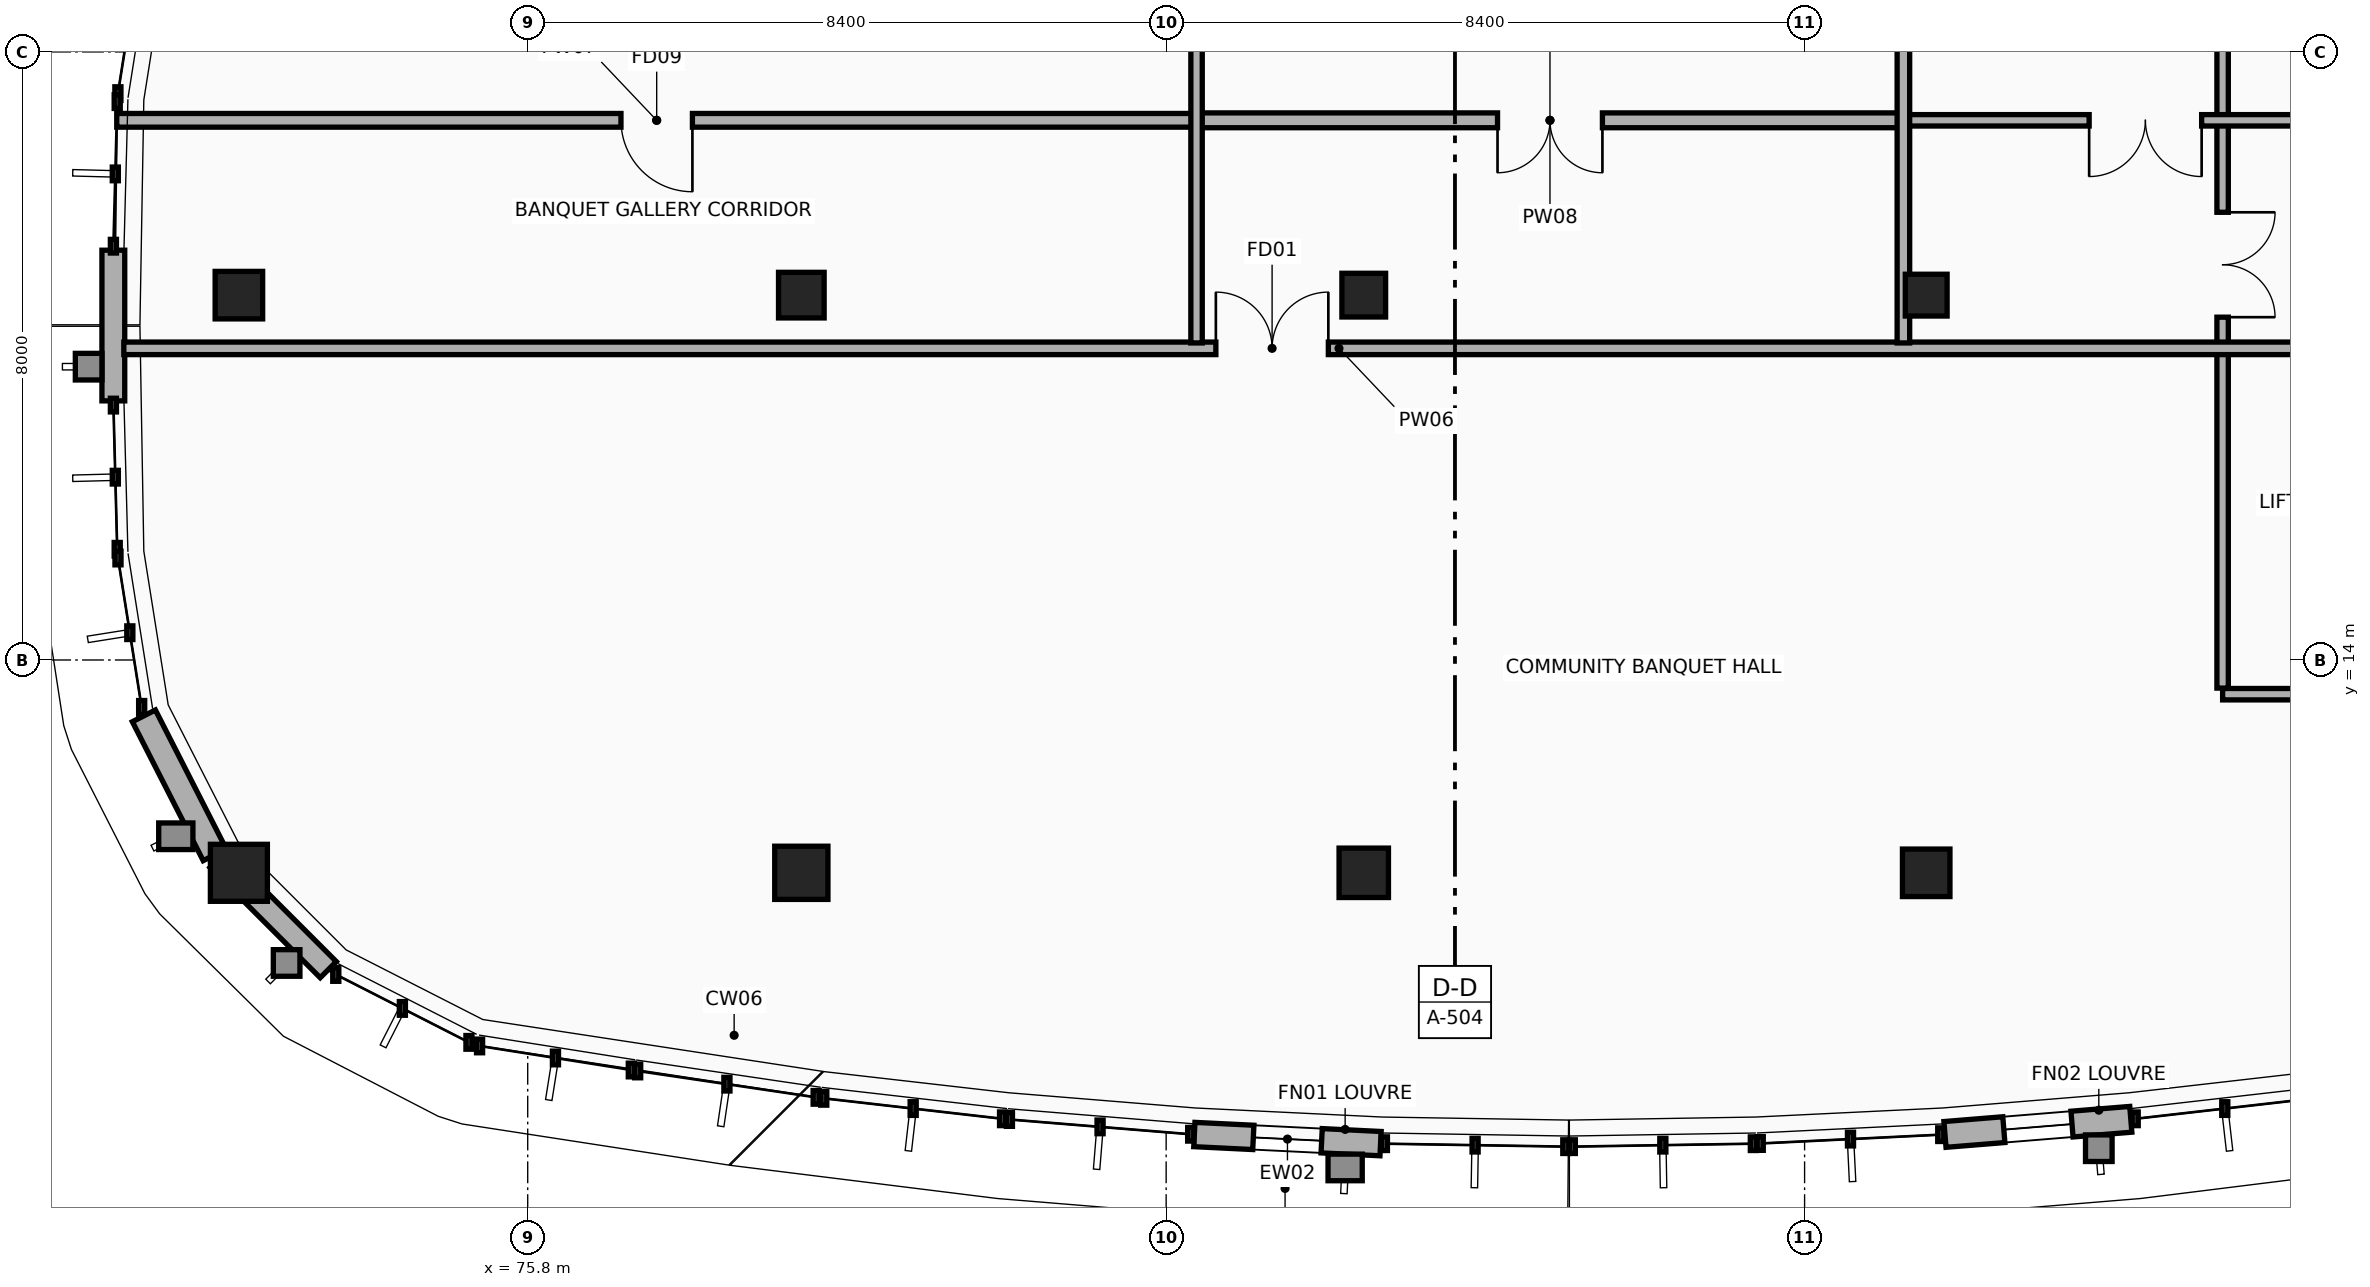
"""IFC4 building model, lengths in metres.
Left out: names, types, materials, properties, quantities, classifications, styles, units other than length and angle.
Written with IfcOpenShell. Run it as: python <this file> out.ifc"""

import sys

from ifc_helpers import new_model, si_unit, direction, frame, frame_2d, origin, origin_2d, place, context, subcontext, project, spatial, rectangle, extrude, element, fill, save


model = new_model("IFC4")
c1 = context("Model", 3, precision=1e-05, world=origin(), true_north=direction((0.0, 1.0)))
c2 = subcontext(c1, "Body", "Model", "MODEL_VIEW")
j1 = project(units=[si_unit("LENGTHUNIT", "METRE"), si_unit("PLANEANGLEUNIT", "RADIAN")], contexts=[c1])
p1 = place(None, origin())
s1 = spatial("IfcSite", under=j1, at=p1, CompositionType="ELEMENT")
p2 = place(p1, origin())
s2 = spatial("IfcBuilding", under=s1, at=p2, CompositionType="ELEMENT")
p3 = place(p2, frame((0.0, 0.0, 4.8)))
s3 = spatial("IfcBuildingStorey", under=s2, at=p3, CompositionType="ELEMENT", Elevation=4.8)
p4 = place(p3, frame((72.0, 11.2, 0.0), z_axis=(0.0, 0.0, 1.0), x_axis=(1.0, 0.0, 0.0)))
e1 = element("IfcColumn", 1, at=p4, inside=s3, PredefinedType="COLUMN", context=c2, shape_type="SweptSolid", body=[
    extrude(rectangle(XDim=0.75, YDim=0.75, at=origin_2d()), origin(), (0.0, 0.0, 1.0), 3.9),
])
p5 = place(p3, frame((72.0, 18.8, 0.0), z_axis=(0.0, 0.0, 1.0), x_axis=(1.0, 0.0, 0.0)))
e2 = element("IfcColumn", 2, at=p5, inside=s3, PredefinedType="COLUMN", context=c2, shape_type="SweptSolid", body=[
    extrude(rectangle(XDim=0.625, YDim=0.625, at=origin_2d()), origin(), (0.0, 0.0, 1.0), 3.9),
])
p6 = place(p3, frame((79.4, 11.2, 0.0), z_axis=(0.0, 0.0, 1.0), x_axis=(1.0, 0.0, 0.0)))
e3 = element("IfcColumn", 3, at=p6, inside=s3, PredefinedType="COLUMN", context=c2, shape_type="SweptSolid", body=[
    extrude(rectangle(XDim=0.7, YDim=0.7, at=origin_2d()), origin(), (0.0, 0.0, 1.0), 3.9),
])
p7 = place(p3, frame((79.4, 18.8, 0.0), z_axis=(0.0, 0.0, 1.0), x_axis=(1.0, 0.0, 0.0)))
e4 = element("IfcColumn", 4, at=p7, inside=s3, PredefinedType="COLUMN", context=c2, shape_type="SweptSolid", body=[
    extrude(rectangle(XDim=0.6, YDim=0.6, at=origin_2d()), origin(), (0.0, 0.0, 1.0), 3.9),
])
p8 = place(p3, frame((86.8, 11.2, 0.0), z_axis=(0.0, 0.0, 1.0), x_axis=(1.0, 0.0, 0.0)))
e5 = element("IfcColumn", 5, at=p8, inside=s3, PredefinedType="COLUMN", context=c2, shape_type="SweptSolid", body=[
    extrude(rectangle(XDim=0.65, YDim=0.65, at=origin_2d()), origin(), (0.0, 0.0, 1.0), 3.9),
])
p9 = place(p3, frame((86.8, 18.8, 0.0), z_axis=(0.0, 0.0, 1.0), x_axis=(1.0, 0.0, 0.0)))
e6 = element("IfcColumn", 6, at=p9, inside=s3, PredefinedType="COLUMN", context=c2, shape_type="SweptSolid", body=[
    extrude(rectangle(XDim=0.575, YDim=0.575, at=origin_2d()), origin(), (0.0, 0.0, 1.0), 3.9),
])
p10 = place(p3, frame((94.2, 11.2, 0.0), z_axis=(0.0, 0.0, 1.0), x_axis=(1.0, 0.0, 0.0)))
e7 = element("IfcColumn", 7, at=p10, inside=s3, PredefinedType="COLUMN", context=c2, shape_type="SweptSolid", body=[
    extrude(rectangle(XDim=0.625, YDim=0.625, at=origin_2d()), origin(), (0.0, 0.0, 1.0), 3.9),
])
p11 = place(p3, frame((94.2, 18.8, 0.0), z_axis=(0.0, 0.0, 1.0), x_axis=(1.0, 0.0, 0.0)))
e8 = element("IfcColumn", 8, at=p11, inside=s3, PredefinedType="COLUMN", context=c2, shape_type="SweptSolid", body=[
    extrude(rectangle(XDim=0.55, YDim=0.55, at=origin_2d()), origin(), (0.0, 0.0, 1.0), 3.9),
])
p12 = place(p3, frame((87.021, 7.637, 0.0), z_axis=(0.0, 0.0, 1.0), x_axis=(-0.998800270453, 0.048969579777, 0.0)))
e9 = element("IfcWall", 9, at=p12, inside=s3, PredefinedType="STANDARD", context=c2, shape_type="SweptSolid", body=[
    extrude(rectangle(XDim=2.453, YDim=0.32, at=frame_2d((1.227, 0.0))), origin(), (0.0, 0.0, 1.0), 3.62),
])
p13 = place(p12, frame((0.776, 0.0, 0.9)))
e10 = element("IfcOpeningElement", 10, at=p13, cuts=e9, PredefinedType="OPENING", context=c2, shape_type="SweptSolid", body=[
    extrude(rectangle(XDim=0.9, YDim=1.2, at=frame_2d((0.45, 0.6))), frame((0.0, 0.17, 0.0), z_axis=(0.0, -1.0, 0.0), x_axis=(1.0, 0.0, 0.0)), (0.0, 0.0, 1.0), 0.34),
])
p14 = place(p3, frame((96.892, 7.957, 0.0), z_axis=(0.0, 0.0, 1.0), x_axis=(-0.996705171675, -0.081109806781, 0.0)))
e11 = element("IfcWall", 11, at=p14, inside=s3, PredefinedType="STANDARD", context=c2, shape_type="SweptSolid", body=[
    extrude(rectangle(XDim=2.453, YDim=0.34, at=frame_2d((1.227, 0.0))), origin(), (0.0, 0.0, 1.0), 3.62),
])
p15 = place(p14, frame((0.776, 0.0, 0.9)))
e12 = element("IfcOpeningElement", 12, at=p15, cuts=e11, PredefinedType="OPENING", context=c2, shape_type="SweptSolid", body=[
    extrude(rectangle(XDim=0.9, YDim=1.2, at=frame_2d((0.45, 0.6))), frame((0.0, 0.18, 0.0), z_axis=(0.0, -1.0, 0.0), x_axis=(1.0, 0.0, 0.0)), (0.0, 0.0, 1.0), 0.36),
])
p16 = place(p3, frame((70.348, 17.409, 0.0), z_axis=(0.0, 0.0, 1.0), x_axis=(0.0, 1.0, 0.0)))
e13 = element("IfcWall", 13, at=p16, inside=s3, PredefinedType="STANDARD", context=c2, shape_type="SweptSolid", body=[
    extrude(rectangle(XDim=1.982, YDim=0.3, at=frame_2d((0.991, 0.0))), origin(), (0.0, 0.0, 1.0), 3.612),
])
p17 = place(p3, frame((71.682, 11.437, 0.0), z_axis=(0.0, 0.0, 1.0), x_axis=(-0.454196706874, 0.890901426346, 0.0)))
e14 = element("IfcWall", 14, at=p17, inside=s3, PredefinedType="STANDARD", context=c2, shape_type="SweptSolid", body=[
    extrude(rectangle(XDim=2.052, YDim=0.34, at=frame_2d((1.026, 0.0))), origin(), (0.0, 0.0, 1.0), 3.62),
])
p18 = place(p3, frame((73.176, 9.926, 0.0), z_axis=(0.0, 0.0, 1.0), x_axis=(-0.707106781187, 0.707106781187, 0.0)))
e15 = element("IfcWall", 15, at=p18, inside=s3, PredefinedType="STANDARD", context=c2, shape_type="SweptSolid", body=[
    extrude(rectangle(XDim=2.051, YDim=0.3, at=frame_2d((1.025, 0.0))), origin(), (0.0, 0.0, 1.0), 3.108),
])
p19 = place(p3, frame((98.1, 13.55, 0.0), z_axis=(0.0, 0.0, 1.0), x_axis=(1.0, 0.0, 0.0)))
e16 = element("IfcWall", 16, at=p19, inside=s3, PredefinedType="PARTITIONING", context=c2, shape_type="SweptSolid", body=[
    extrude(rectangle(XDim=4.365, YDim=0.15, at=frame_2d((2.183, 0.0))), origin(), (0.0, 0.0, 1.0), 3.045),
])
p20 = place(p3, frame((98.1, 24.77, 0.0), z_axis=(0.0, 0.0, 1.0), x_axis=(0.0, -1.0, 0.0)))
e17 = element("IfcWall", 17, at=p20, inside=s3, PredefinedType="PARTITIONING", context=c2, shape_type="SweptSolid", body=[
    extrude(rectangle(XDim=11.14, YDim=0.15, at=frame_2d((5.57, 0.0))), origin(), (0.0, 0.0, 1.0), 3.232),
])
p21 = place(p20, frame((4.88, 0.0, 0.0)))
e18 = element("IfcOpeningElement", 18, at=p21, cuts=e17, PredefinedType="OPENING", context=c2, shape_type="SweptSolid", body=[
    extrude(rectangle(XDim=1.38, YDim=2.2, at=frame_2d((0.69, 1.1))), frame((0.0, 0.085, 0.0), z_axis=(0.0, -1.0, 0.0), x_axis=(1.0, 0.0, 0.0)), (0.0, 0.0, 1.0), 0.17),
])
p22 = place(p3, frame((70.486, 18.1, 0.0), z_axis=(0.0, 0.0, 1.0), x_axis=(1.0, 0.0, 0.0)))
e19 = element("IfcWall", 19, at=p22, inside=s3, PredefinedType="PARTITIONING", context=c2, shape_type="SweptSolid", body=[
    extrude(rectangle(XDim=31.976, YDim=0.165, at=frame_2d((15.988, 0.0))), origin(), (0.0, 0.0, 1.0), 3.045),
])
p23 = place(p22, frame((14.368, 0.0, 0.0)))
e20 = element("IfcOpeningElement", 20, at=p23, cuts=e19, PredefinedType="OPENING", context=c2, shape_type="SweptSolid", body=[
    extrude(rectangle(XDim=1.48, YDim=2.22, at=frame_2d((0.74, 1.11))), frame((0.0, 0.093, 0.0), z_axis=(0.0, -1.0, 0.0), x_axis=(1.0, 0.0, 0.0)), (0.0, 0.0, 1.0), 0.185),
])
p24 = place(p3, frame((84.6, 21.1, 0.0), z_axis=(0.0, 0.0, 1.0), x_axis=(-1.0, 0.0, 0.0)))
e21 = element("IfcWall", 21, at=p24, inside=s3, PredefinedType="PARTITIONING", context=c2, shape_type="SweptSolid", body=[
    extrude(rectangle(XDim=14.207, YDim=0.18, at=frame_2d((7.104, 0.0))), origin(), (0.0, 0.0, 1.0), 3.095),
])
p25 = place(p24, frame((6.633, 0.0, 0.0)))
e22 = element("IfcOpeningElement", 22, at=p25, cuts=e21, PredefinedType="OPENING", context=c2, shape_type="SweptSolid", body=[
    extrude(rectangle(XDim=0.94, YDim=2.1, at=frame_2d((0.47, 1.05))), frame((0.0, 0.1, 0.0), z_axis=(0.0, -1.0, 0.0), x_axis=(1.0, 0.0, 0.0)), (0.0, 0.0, 1.0), 0.2),
])
p26 = place(p3, frame((93.9, 21.1, 0.0), z_axis=(0.0, 0.0, 1.0), x_axis=(-1.0, 0.0, 0.0)))
e23 = element("IfcWall", 23, at=p26, inside=s3, PredefinedType="PARTITIONING", context=c2, shape_type="SweptSolid", body=[
    extrude(rectangle(XDim=9.3, YDim=0.195, at=frame_2d((4.65, 0.0))), origin(), (0.0, 0.0, 1.0), 3.07),
])
p27 = place(p26, frame((3.96, 0.0, 0.0)))
e24 = element("IfcOpeningElement", 24, at=p27, cuts=e23, PredefinedType="OPENING", context=c2, shape_type="SweptSolid", body=[
    extrude(rectangle(XDim=1.38, YDim=2.2, at=frame_2d((0.69, 1.1))), frame((0.0, 0.107, 0.0), z_axis=(0.0, -1.0, 0.0), x_axis=(1.0, 0.0, 0.0)), (0.0, 0.0, 1.0), 0.215),
])
p28 = place(p3, frame((102.462, 21.1, 0.0), z_axis=(0.0, 0.0, 1.0), x_axis=(-1.0, 0.0, 0.0)))
e25 = element("IfcWall", 25, at=p28, inside=s3, PredefinedType="PARTITIONING", context=c2, shape_type="SweptSolid", body=[
    extrude(rectangle(XDim=8.562, YDim=0.15, at=frame_2d((4.281, 0.0))), origin(), (0.0, 0.0, 1.0), 2.995),
])
p29 = place(p28, frame((4.638, 0.0, 0.0)))
e26 = element("IfcOpeningElement", 26, at=p29, cuts=e25, PredefinedType="OPENING", context=c2, shape_type="SweptSolid", body=[
    extrude(rectangle(XDim=1.48, YDim=2.22, at=frame_2d((0.74, 1.11))), frame((0.0, 0.085, 0.0), z_axis=(0.0, -1.0, 0.0), x_axis=(1.0, 0.0, 0.0)), (0.0, 0.0, 1.0), 0.17),
])
p30 = place(p3, frame((84.6, 18.171, 0.0), z_axis=(0.0, 0.0, 1.0), x_axis=(0.0, 1.0, 0.0)))
e27 = element("IfcWall", 27, at=p30, inside=s3, PredefinedType="PARTITIONING", context=c2, shape_type="SweptSolid", body=[
    extrude(rectangle(XDim=10.873, YDim=0.15, at=frame_2d((5.437, 0.0))), origin(), (0.0, 0.0, 1.0), 3.236),
])
p31 = place(p3, frame((93.9, 18.171, 0.0), z_axis=(0.0, 0.0, 1.0), x_axis=(0.0, 1.0, 0.0)))
e28 = element("IfcWall", 28, at=p31, inside=s3, PredefinedType="PARTITIONING", context=c2, shape_type="SweptSolid", body=[
    extrude(rectangle(XDim=10.898, YDim=0.165, at=frame_2d((5.449, 0.0))), origin(), (0.0, 0.0, 1.0), 3.045),
])
p32 = place(p13, origin())
e29 = element("IfcWindow", 29, at=p32, inside=s3, PartitioningType="SINGLE_PANEL", PredefinedType="WINDOW", context=c2, shape_type="SweptSolid", body=[
    extrude(rectangle(XDim=0.9, YDim=1.2, at=frame_2d((0.45, 0.6))), frame((0.0, 0.03, 0.0), z_axis=(0.0, -1.0, 0.0), x_axis=(1.0, 0.0, 0.0)), (0.0, 0.0, 1.0), 0.06),
])
fill(e10, e29)
p33 = place(p15, origin())
e30 = element("IfcWindow", 30, at=p33, inside=s3, PartitioningType="SINGLE_PANEL", PredefinedType="WINDOW", context=c2, shape_type="SweptSolid", body=[
    extrude(rectangle(XDim=0.9, YDim=1.2, at=frame_2d((0.45, 0.6))), frame((0.0, 0.03, 0.0), z_axis=(0.0, -1.0, 0.0), x_axis=(1.0, 0.0, 0.0)), (0.0, 0.0, 1.0), 0.06),
])
fill(e12, e30)
p34 = place(p21, origin())
e31 = element("IfcDoor", 31, at=p34, inside=s3, OperationType="DOUBLE_DOOR_SINGLE_SWING", PredefinedType="DOOR", context=c2, shape_type="SweptSolid", body=[
    extrude(rectangle(XDim=1.38, YDim=2.2, at=frame_2d((0.69, 1.1))), frame((0.0, 0.025, 0.0), z_axis=(0.0, -1.0, 0.0), x_axis=(1.0, 0.0, 0.0)), (0.0, 0.0, 1.0), 0.05),
])
fill(e18, e31)
p35 = place(p23, origin())
e32 = element("IfcDoor", 32, at=p35, inside=s3, OperationType="DOUBLE_DOOR_SINGLE_SWING", PredefinedType="DOOR", context=c2, shape_type="SweptSolid", body=[
    extrude(rectangle(XDim=1.48, YDim=2.22, at=frame_2d((0.74, 1.11))), frame((0.0, 0.025, 0.0), z_axis=(0.0, -1.0, 0.0), x_axis=(1.0, 0.0, 0.0)), (0.0, 0.0, 1.0), 0.05),
])
fill(e20, e32)
p36 = place(p25, origin())
e33 = element("IfcDoor", 33, at=p36, inside=s3, OperationType="SINGLE_SWING_LEFT", PredefinedType="DOOR", context=c2, shape_type="SweptSolid", body=[
    extrude(rectangle(XDim=0.94, YDim=2.1, at=frame_2d((0.47, 1.05))), frame((0.0, 0.025, 0.0), z_axis=(0.0, -1.0, 0.0), x_axis=(1.0, 0.0, 0.0)), (0.0, 0.0, 1.0), 0.05),
])
fill(e22, e33)
p37 = place(p27, origin())
e34 = element("IfcDoor", 34, at=p37, inside=s3, OperationType="DOUBLE_DOOR_SINGLE_SWING", PredefinedType="DOOR", context=c2, shape_type="SweptSolid", body=[
    extrude(rectangle(XDim=1.38, YDim=2.2, at=frame_2d((0.69, 1.1))), frame((0.0, 0.025, 0.0), z_axis=(0.0, -1.0, 0.0), x_axis=(1.0, 0.0, 0.0)), (0.0, 0.0, 1.0), 0.05),
])
fill(e24, e34)
p38 = place(p29, origin())
e35 = element("IfcDoor", 35, at=p38, inside=s3, OperationType="DOUBLE_DOOR_SINGLE_SWING", PredefinedType="DOOR", context=c2, shape_type="SweptSolid", body=[
    extrude(rectangle(XDim=1.48, YDim=2.22, at=frame_2d((0.74, 1.11))), frame((0.0, 0.025, 0.0), z_axis=(0.0, -1.0, 0.0), x_axis=(1.0, 0.0, 0.0)), (0.0, 0.0, 1.0), 0.05),
])
fill(e26, e35)
save(model, sys.argv[1])
